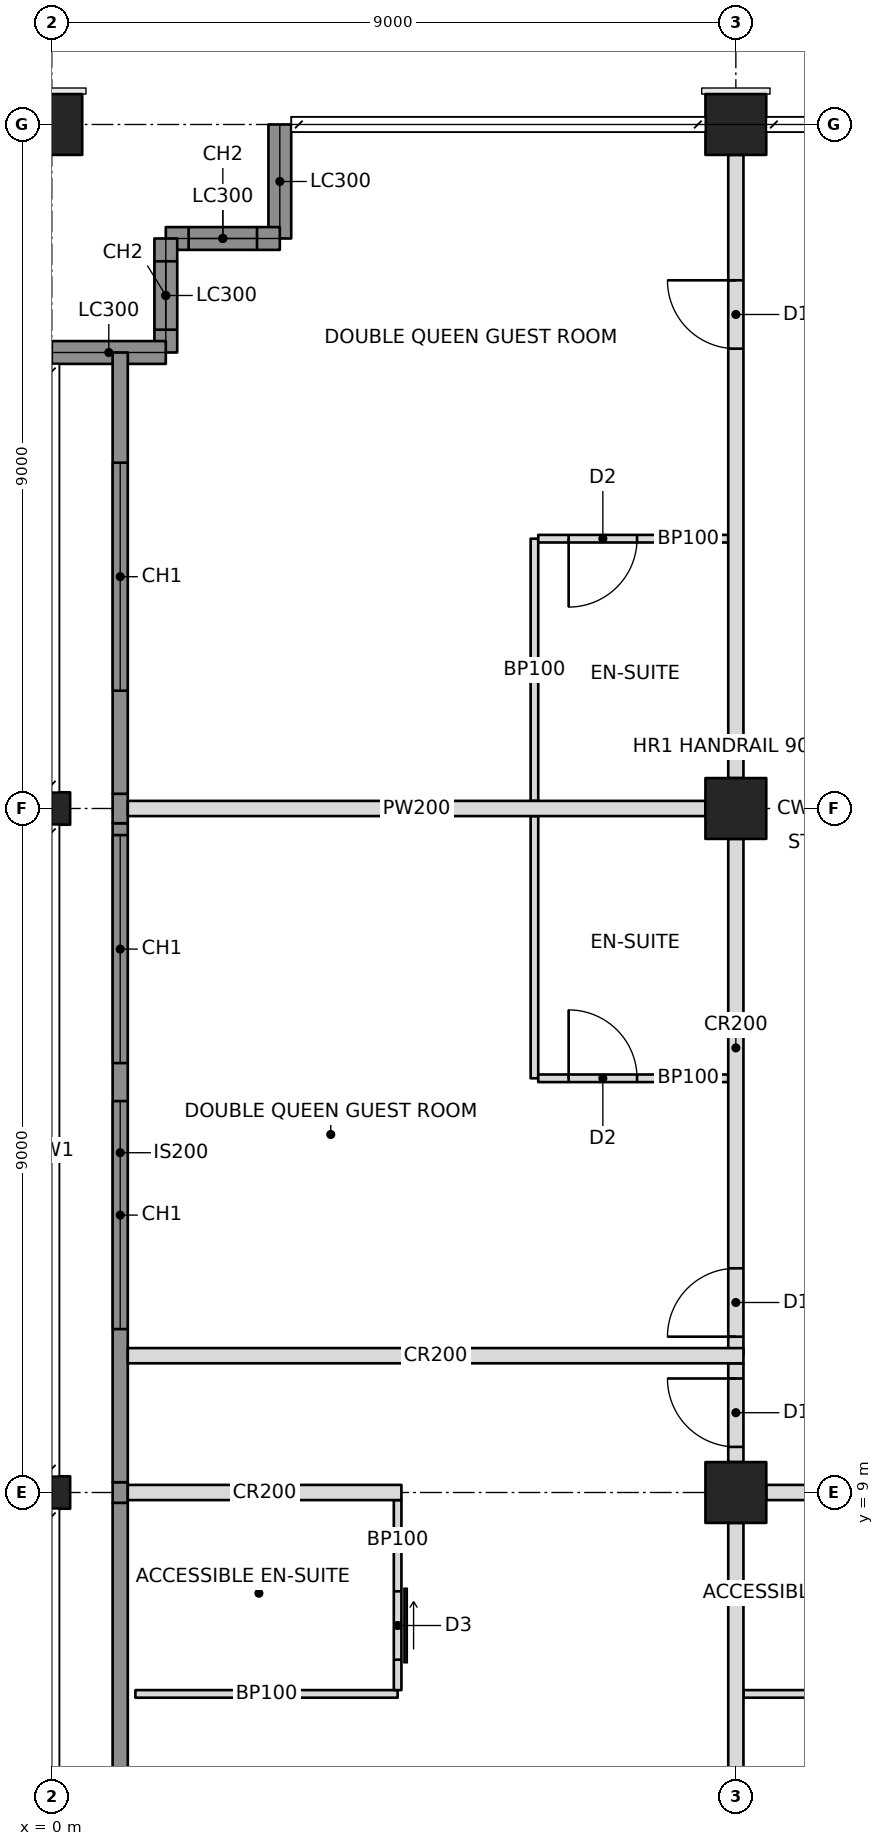
"""IFC4 building model, lengths in metres.
Left out: names, types, materials, properties, quantities, classifications, styles, units other than length and angle.
Written with IfcOpenShell. Run it as: python <this file> out.ifc"""

import sys

from ifc_helpers import new_model, si_unit, direction, frame, frame_2d, origin, origin_2d, place, context, subcontext, project, spatial, rectangle, hollow_rectangle, i_section, extrude, element, fill, save


model = new_model("IFC4")
c1 = context("Model", 3, precision=1e-05, world=origin(), true_north=direction((0.0, 1.0)))
c2 = subcontext(c1, "Body", "Model", "MODEL_VIEW")
j1 = project(units=[si_unit("LENGTHUNIT", "METRE"), si_unit("PLANEANGLEUNIT", "RADIAN")], contexts=[c1])
p1 = place(None, origin())
s1 = spatial("IfcSite", under=j1, at=p1, CompositionType="ELEMENT")
p2 = place(p1, origin())
s2 = spatial("IfcBuilding", under=s1, at=p2, CompositionType="ELEMENT")
p3 = place(p2, frame((0.0, 0.0, 197.8)))
s3 = spatial("IfcBuildingStorey", under=s2, at=p3, CompositionType="ELEMENT", Elevation=197.8)
for number, where, z_axis, x_axis in (
    (1, (0.0, 9.0, 0.0), (0.0, 0.0, 1.0), (0.0, 1.0, 0.0)),
    (2, (0.0, 18.0, 0.0), (0.0, 0.0, 1.0), (0.0, 1.0, 0.0)),
):
    element("IfcColumn", number, at=place(p3, frame(where, z_axis=z_axis, x_axis=x_axis)), inside=s3, PredefinedType="COLUMN", context=c2, shape_type="SweptSolid", body=[
        extrude(i_section(OverallWidth=0.427, OverallDepth=0.483, WebThickness=0.051, FlangeThickness=0.082, at=origin_2d()), origin(), (0.0, 0.0, 1.0), 3.4),
    ])
p4 = place(p3, frame((0.0, 27.0, 0.0), z_axis=(0.0, 0.0, 1.0), x_axis=(0.0, 1.0, 0.0)))
e3 = element("IfcColumn", 3, at=p4, inside=s3, PredefinedType="COLUMN", context=c2, shape_type="SweptSolid", body=[
    extrude(hollow_rectangle(XDim=0.8, YDim=0.8, WallThickness=0.06, at=origin_2d()), origin(), (0.0, 0.0, 1.0), 3.4),
])
for number, where, z_axis, x_axis in (
    (4, (9.0, 9.0, 0.0), (0.0, 0.0, 1.0), (1.0, 0.0, 0.0)),
    (5, (9.0, 18.0, 0.0), (0.0, 0.0, 1.0), (1.0, 0.0, 0.0)),
):
    element("IfcColumn", number, at=place(p3, frame(where, z_axis=z_axis, x_axis=x_axis)), inside=s3, PredefinedType="COLUMN", context=c2, shape_type="SweptSolid", body=[
        extrude(hollow_rectangle(XDim=0.8, YDim=0.8, WallThickness=0.05, at=origin_2d()), origin(), (0.0, 0.0, 1.0), 3.4),
    ])
p5 = place(p3, frame((9.0, 27.0, 0.0), z_axis=(0.0, 0.0, 1.0), x_axis=(1.0, 0.0, 0.0)))
e6 = element("IfcColumn", 6, at=p5, inside=s3, PredefinedType="COLUMN", context=c2, shape_type="SweptSolid", body=[
    extrude(hollow_rectangle(XDim=0.8, YDim=0.8, WallThickness=0.06, at=origin_2d()), origin(), (0.0, 0.0, 1.0), 3.4),
])
p6 = place(p3, frame((3.0, 27.0, 0.0), z_axis=(0.0, 0.0, 1.0), x_axis=(0.0, -1.0, 0.0)))
e7 = element("IfcWall", 7, at=p6, inside=s3, PredefinedType="SOLIDWALL", context=c2, shape_type="SweptSolid", body=[
    extrude(rectangle(XDim=1.5, YDim=0.3, at=frame_2d((0.75, 0.0))), origin(), (0.0, 0.0, 1.0), 2.42),
])
p7 = place(p3, frame((3.0, 25.5, 0.0), z_axis=(0.0, 0.0, 1.0), x_axis=(-1.0, 0.0, 0.0)))
e8 = element("IfcWall", 8, at=p7, inside=s3, PredefinedType="SOLIDWALL", context=c2, shape_type="SweptSolid", body=[
    extrude(rectangle(XDim=1.5, YDim=0.3, at=frame_2d((0.75, 0.0))), origin(), (0.0, 0.0, 1.0), 3.2),
])
p8 = place(p7, frame((0.3, 0.0, 0.6)))
e9 = element("IfcOpeningElement", 9, at=p8, cuts=e8, PredefinedType="OPENING", context=c2, shape_type="SweptSolid", body=[
    extrude(rectangle(XDim=0.9, YDim=2.2, at=frame_2d((0.45, 1.1))), frame((0.0, 0.16, 0.0), z_axis=(0.0, -1.0, 0.0), x_axis=(1.0, 0.0, 0.0)), (0.0, 0.0, 1.0), 0.32),
])
p9 = place(p3, frame((1.5, 25.5, 0.0), z_axis=(0.0, 0.0, 1.0), x_axis=(0.0, -1.0, 0.0)))
e10 = element("IfcWall", 10, at=p9, inside=s3, PredefinedType="SOLIDWALL", context=c2, shape_type="SweptSolid", body=[
    extrude(rectangle(XDim=1.5, YDim=0.3, at=frame_2d((0.75, 0.0))), origin(), (0.0, 0.0, 1.0), 3.2),
])
p10 = place(p9, frame((0.3, 0.0, 0.6)))
e11 = element("IfcOpeningElement", 11, at=p10, cuts=e10, PredefinedType="OPENING", context=c2, shape_type="SweptSolid", body=[
    extrude(rectangle(XDim=0.9, YDim=2.2, at=frame_2d((0.45, 1.1))), frame((0.0, 0.16, 0.0), z_axis=(0.0, -1.0, 0.0), x_axis=(1.0, 0.0, 0.0)), (0.0, 0.0, 1.0), 0.32),
])
p11 = place(p3, frame((1.5, 24.0, 0.0), z_axis=(0.0, 0.0, 1.0), x_axis=(-1.0, 0.0, 0.0)))
e12 = element("IfcWall", 12, at=p11, inside=s3, PredefinedType="SOLIDWALL", context=c2, shape_type="SweptSolid", body=[
    extrude(rectangle(XDim=1.5, YDim=0.3, at=frame_2d((0.75, 0.0))), origin(), (0.0, 0.0, 1.0), 2.42),
])
p12 = place(p3, frame((1.0, 9.0, 0.0), z_axis=(0.0, 0.0, 1.0), x_axis=(1.0, 0.0, 0.0)))
e13 = element("IfcWall", 13, at=p12, inside=s3, PredefinedType="PARTITIONING", context=c2, shape_type="SweptSolid", body=[
    extrude(rectangle(XDim=3.6, YDim=0.2, at=frame_2d((1.8, 0.0))), origin(), (0.0, 0.0, 1.0), 2.438),
])
p13 = place(p3, frame((9.4, 9.0, 0.0), z_axis=(0.0, 0.0, 1.0), x_axis=(1.0, 0.0, 0.0)))
e14 = element("IfcWall", 14, at=p13, inside=s3, PredefinedType="PARTITIONING", context=c2, shape_type="SweptSolid", body=[
    extrude(rectangle(XDim=8.2, YDim=0.2, at=frame_2d((4.1, 0.0))), origin(), (0.0, 0.0, 1.0), 2.405),
])
p14 = place(p13, frame((2.95, 0.0, 0.0)))
e15 = element("IfcOpeningElement", 15, at=p14, cuts=e14, PredefinedType="OPENING", context=c2, shape_type="SweptSolid", body=[
    extrude(rectangle(XDim=0.9, YDim=2.1, at=frame_2d((0.45, 1.05))), frame((0.0, 0.11, 0.0), z_axis=(0.0, -1.0, 0.0), x_axis=(1.0, 0.0, 0.0)), (0.0, 0.0, 1.0), 0.22),
])
p15 = place(p13, frame((4.35, 0.0, 0.0)))
e16 = element("IfcOpeningElement", 16, at=p15, cuts=e14, PredefinedType="OPENING", context=c2, shape_type="SweptSolid", body=[
    extrude(rectangle(XDim=0.9, YDim=2.1, at=frame_2d((0.45, 1.05))), frame((0.0, 0.11, 0.0), z_axis=(0.0, -1.0, 0.0), x_axis=(1.0, 0.0, 0.0)), (0.0, 0.0, 1.0), 0.22),
])
p16 = place(p3, frame((9.0, 10.8, 0.0), z_axis=(0.0, 0.0, 1.0), x_axis=(0.0, 1.0, 0.0)))
e17 = element("IfcWall", 17, at=p16, inside=s3, PredefinedType="PARTITIONING", context=c2, shape_type="SweptSolid", body=[
    extrude(rectangle(XDim=6.8, YDim=0.2, at=frame_2d((3.4, 0.0))), origin(), (0.0, 0.0, 1.0), 2.405),
])
p17 = place(p16, frame((0.25, 0.0, 0.0)))
e18 = element("IfcOpeningElement", 18, at=p17, cuts=e17, PredefinedType="OPENING", context=c2, shape_type="SweptSolid", body=[
    extrude(rectangle(XDim=0.9, YDim=2.1, at=frame_2d((0.45, 1.05))), frame((0.0, 0.11, 0.0), z_axis=(0.0, -1.0, 0.0), x_axis=(1.0, 0.0, 0.0)), (0.0, 0.0, 1.0), 0.22),
])
p18 = place(p3, frame((9.0, 18.4, 0.0), z_axis=(0.0, 0.0, 1.0), x_axis=(0.0, 1.0, 0.0)))
e19 = element("IfcWall", 19, at=p18, inside=s3, PredefinedType="PARTITIONING", context=c2, shape_type="SweptSolid", body=[
    extrude(rectangle(XDim=8.2, YDim=0.2, at=frame_2d((4.1, 0.0))), origin(), (0.0, 0.0, 1.0), 2.405),
])
p19 = place(p18, frame((5.65, 0.0, 0.0)))
e20 = element("IfcOpeningElement", 20, at=p19, cuts=e19, PredefinedType="OPENING", context=c2, shape_type="SweptSolid", body=[
    extrude(rectangle(XDim=0.9, YDim=2.1, at=frame_2d((0.45, 1.05))), frame((0.0, 0.11, 0.0), z_axis=(0.0, -1.0, 0.0), x_axis=(1.0, 0.0, 0.0)), (0.0, 0.0, 1.0), 0.22),
])
p20 = place(p3, frame((1.0, 10.8, 0.0), z_axis=(0.0, 0.0, 1.0), x_axis=(1.0, 0.0, 0.0)))
e21 = element("IfcWall", 21, at=p20, inside=s3, PredefinedType="PARTITIONING", context=c2, shape_type="SweptSolid", body=[
    extrude(rectangle(XDim=8.1, YDim=0.2, at=frame_2d((4.05, 0.0))), origin(), (0.0, 0.0, 1.0), 2.404),
])
p21 = place(p3, frame((9.0, 8.6, 0.0), z_axis=(0.0, 0.0, 1.0), x_axis=(0.0, -1.0, 0.0)))
e22 = element("IfcWall", 22, at=p21, inside=s3, PredefinedType="PARTITIONING", context=c2, shape_type="SweptSolid", body=[
    extrude(rectangle(XDim=7.6, YDim=0.2, at=frame_2d((3.8, 0.0))), origin(), (0.0, 0.0, 1.0), 2.438),
])
p22 = place(p3, frame((1.1, 6.35, 0.0), z_axis=(0.0, 0.0, 1.0), x_axis=(1.0, 0.0, 0.0)))
e23 = element("IfcWall", 23, at=p22, inside=s3, PredefinedType="PARTITIONING", context=c2, shape_type="SweptSolid", body=[
    extrude(rectangle(XDim=3.45, YDim=0.1, at=frame_2d((1.725, 0.0))), origin(), (0.0, 0.0, 1.0), 3.2),
])
p23 = place(p3, frame((4.55, 8.9, 0.0), z_axis=(0.0, 0.0, 1.0), x_axis=(0.0, -1.0, 0.0)))
e24 = element("IfcWall", 24, at=p23, inside=s3, PredefinedType="PARTITIONING", context=c2, shape_type="SweptSolid", body=[
    extrude(rectangle(XDim=2.5, YDim=0.1, at=frame_2d((1.25, 0.0))), origin(), (0.0, 0.0, 1.0), 2.438),
])
p24 = place(p23, frame((1.2, 0.0, 0.0)))
e25 = element("IfcOpeningElement", 25, at=p24, cuts=e24, PredefinedType="OPENING", context=c2, shape_type="SweptSolid", body=[
    extrude(rectangle(XDim=0.9, YDim=2.1, at=frame_2d((0.45, 1.05))), frame((0.0, 0.06, 0.0), z_axis=(0.0, -1.0, 0.0), x_axis=(1.0, 0.0, 0.0)), (0.0, 0.0, 1.0), 0.12),
])
p25 = place(p3, frame((9.1, 6.35, 0.0), z_axis=(0.0, 0.0, 1.0), x_axis=(1.0, 0.0, 0.0)))
e26 = element("IfcWall", 26, at=p25, inside=s3, PredefinedType="PARTITIONING", context=c2, shape_type="SweptSolid", body=[
    extrude(rectangle(XDim=2.95, YDim=0.1, at=frame_2d((1.475, 0.0))), origin(), (0.0, 0.0, 1.0), 2.438),
])
p26 = place(p3, frame((8.6, 18.0, 0.0), z_axis=(0.0, 0.0, 1.0), x_axis=(-1.0, 0.0, 0.0)))
e27 = element("IfcWall", 27, at=p26, inside=s3, PredefinedType="PARTITIONING", context=c2, shape_type="SweptSolid", body=[
    extrude(rectangle(XDim=7.6, YDim=0.2, at=frame_2d((3.8, 0.0))), origin(), (0.0, 0.0, 1.0), 2.405),
])
p27 = place(p3, frame((6.35, 14.45, 0.0), z_axis=(0.0, 0.0, 1.0), x_axis=(0.0, 1.0, 0.0)))
e28 = element("IfcWall", 28, at=p27, inside=s3, PredefinedType="PARTITIONING", context=c2, shape_type="SweptSolid", body=[
    extrude(rectangle(XDim=3.45, YDim=0.1, at=frame_2d((1.725, 0.0))), origin(), (0.0, 0.0, 1.0), 2.404),
])
p28 = place(p3, frame((8.9, 14.45, 0.0), z_axis=(0.0, 0.0, 1.0), x_axis=(-1.0, 0.0, 0.0)))
e29 = element("IfcWall", 29, at=p28, inside=s3, PredefinedType="PARTITIONING", context=c2, shape_type="SweptSolid", body=[
    extrude(rectangle(XDim=2.5, YDim=0.1, at=frame_2d((1.25, 0.0))), origin(), (0.0, 0.0, 1.0), 2.404),
])
p29 = place(p28, frame((1.2, 0.0, 0.0)))
e30 = element("IfcOpeningElement", 30, at=p29, cuts=e29, PredefinedType="OPENING", context=c2, shape_type="SweptSolid", body=[
    extrude(rectangle(XDim=0.9, YDim=2.1, at=frame_2d((0.45, 1.05))), frame((0.0, 0.06, 0.0), z_axis=(0.0, -1.0, 0.0), x_axis=(1.0, 0.0, 0.0)), (0.0, 0.0, 1.0), 0.12),
])
p30 = place(p3, frame((6.35, 18.1, 0.0), z_axis=(0.0, 0.0, 1.0), x_axis=(0.0, 1.0, 0.0)))
e31 = element("IfcWall", 31, at=p30, inside=s3, PredefinedType="PARTITIONING", context=c2, shape_type="SweptSolid", body=[
    extrude(rectangle(XDim=3.45, YDim=0.1, at=frame_2d((1.725, 0.0))), origin(), (0.0, 0.0, 1.0), 2.404),
])
p31 = place(p3, frame((8.9, 21.55, 0.0), z_axis=(0.0, 0.0, 1.0), x_axis=(-1.0, 0.0, 0.0)))
e32 = element("IfcWall", 32, at=p31, inside=s3, PredefinedType="PARTITIONING", context=c2, shape_type="SweptSolid", body=[
    extrude(rectangle(XDim=2.5, YDim=0.1, at=frame_2d((1.25, 0.0))), origin(), (0.0, 0.0, 1.0), 2.404),
])
p32 = place(p31, frame((1.2, 0.0, 0.0)))
e33 = element("IfcOpeningElement", 33, at=p32, cuts=e32, PredefinedType="OPENING", context=c2, shape_type="SweptSolid", body=[
    extrude(rectangle(XDim=0.9, YDim=2.1, at=frame_2d((0.45, 1.05))), frame((0.0, 0.06, 0.0), z_axis=(0.0, -1.0, 0.0), x_axis=(1.0, 0.0, 0.0)), (0.0, 0.0, 1.0), 0.12),
])
p33 = place(p3, frame((9.0, 9.4, 0.0), z_axis=(0.0, 0.0, 1.0), x_axis=(0.0, 1.0, 0.0)))
e34 = element("IfcWall", 34, at=p33, inside=s3, PredefinedType="PARTITIONING", context=c2, shape_type="SweptSolid", body=[
    extrude(rectangle(XDim=1.3, YDim=0.2, at=frame_2d((0.65, 0.0))), origin(), (0.0, 0.0, 1.0), 2.405),
])
p34 = place(p33, frame((0.2, 0.0, 0.0)))
e35 = element("IfcOpeningElement", 35, at=p34, cuts=e34, PredefinedType="OPENING", context=c2, shape_type="SweptSolid", body=[
    extrude(rectangle(XDim=0.9, YDim=2.1, at=frame_2d((0.45, 1.05))), frame((0.0, 0.11, 0.0), z_axis=(0.0, -1.0, 0.0), x_axis=(1.0, 0.0, 0.0)), (0.0, 0.0, 1.0), 0.22),
])
p35 = place(p3, frame((0.9, 4.607, 0.0), z_axis=(0.0, 0.0, 1.0), x_axis=(0.0, 1.0, 0.0)))
e36 = element("IfcWall", 36, at=p35, inside=s3, PredefinedType="SOLIDWALL", context=c2, shape_type="SweptSolid", body=[
    extrude(rectangle(XDim=4.257, YDim=0.2, at=frame_2d((2.129, 0.0))), origin(), (0.0, 0.0, 1.0), 3.2),
])
p36 = place(p3, frame((0.9, 8.865, 0.0), z_axis=(0.0, 0.0, 1.0), x_axis=(0.0, 1.0, 0.0)))
e37 = element("IfcWall", 37, at=p36, inside=s3, PredefinedType="SOLIDWALL", context=c2, shape_type="SweptSolid", body=[
    extrude(rectangle(XDim=0.271, YDim=0.2, at=frame_2d((0.135, 0.0))), origin(), (0.0, 0.0, 1.0), 2.438),
])
p37 = place(p3, frame((0.9, 9.135, 0.0), z_axis=(0.0, 0.0, 1.0), x_axis=(0.0, 1.0, 0.0)))
e38 = element("IfcWall", 38, at=p37, inside=s3, PredefinedType="SOLIDWALL", context=c2, shape_type="SweptSolid", body=[
    extrude(rectangle(XDim=8.671, YDim=0.2, at=frame_2d((4.335, 0.0))), origin(), (0.0, 0.0, 1.0), 3.2),
])
p38 = place(p37, frame((2.015, 0.0, 0.6)))
e39 = element("IfcOpeningElement", 39, at=p38, cuts=e38, PredefinedType="OPENING", context=c2, shape_type="SweptSolid", body=[
    extrude(rectangle(XDim=3.0, YDim=2.2, at=frame_2d((1.5, 1.1))), frame((0.0, 0.11, 0.0), z_axis=(0.0, -1.0, 0.0), x_axis=(1.0, 0.0, 0.0)), (0.0, 0.0, 1.0), 0.22),
])
p39 = place(p37, frame((5.515, 0.0, 0.6)))
e40 = element("IfcOpeningElement", 40, at=p39, cuts=e38, PredefinedType="OPENING", context=c2, shape_type="SweptSolid", body=[
    extrude(rectangle(XDim=3.0, YDim=2.2, at=frame_2d((1.5, 1.1))), frame((0.0, 0.11, 0.0), z_axis=(0.0, -1.0, 0.0), x_axis=(1.0, 0.0, 0.0)), (0.0, 0.0, 1.0), 0.22),
])
p40 = place(p3, frame((0.9, 17.806, 0.0), z_axis=(0.0, 0.0, 1.0), x_axis=(0.0, 1.0, 0.0)))
e41 = element("IfcWall", 41, at=p40, inside=s3, PredefinedType="SOLIDWALL", context=c2, shape_type="SweptSolid", body=[
    extrude(rectangle(XDim=0.388, YDim=0.2, at=frame_2d((0.194, 0.0))), origin(), (0.0, 0.0, 1.0), 2.404),
])
p41 = place(p3, frame((0.9, 18.194, 0.0), z_axis=(0.0, 0.0, 1.0), x_axis=(0.0, 1.0, 0.0)))
e42 = element("IfcWall", 42, at=p41, inside=s3, PredefinedType="SOLIDWALL", context=c2, shape_type="SweptSolid", body=[
    extrude(rectangle(XDim=5.806, YDim=0.2, at=frame_2d((2.903, 0.0))), origin(), (0.0, 0.0, 1.0), 3.2),
])
p42 = place(p41, frame((1.356, 0.0, 0.6)))
e43 = element("IfcOpeningElement", 43, at=p42, cuts=e42, PredefinedType="OPENING", context=c2, shape_type="SweptSolid", body=[
    extrude(rectangle(XDim=3.0, YDim=2.2, at=frame_2d((1.5, 1.1))), frame((0.0, 0.11, 0.0), z_axis=(0.0, -1.0, 0.0), x_axis=(1.0, 0.0, 0.0)), (0.0, 0.0, 1.0), 0.22),
])
p43 = place(p8, origin())
e44 = element("IfcWindow", 44, at=p43, inside=s3, PartitioningType="SINGLE_PANEL", PredefinedType="WINDOW", context=c2, shape_type="SweptSolid", body=[
    extrude(rectangle(XDim=0.9, YDim=2.2, at=frame_2d((0.45, 1.1))), frame((0.0, 0.03, 0.0), z_axis=(0.0, -1.0, 0.0), x_axis=(1.0, 0.0, 0.0)), (0.0, 0.0, 1.0), 0.06),
])
fill(e9, e44)
p44 = place(p10, origin())
e45 = element("IfcWindow", 45, at=p44, inside=s3, PartitioningType="SINGLE_PANEL", PredefinedType="WINDOW", context=c2, shape_type="SweptSolid", body=[
    extrude(rectangle(XDim=0.9, YDim=2.2, at=frame_2d((0.45, 1.1))), frame((0.0, 0.03, 0.0), z_axis=(0.0, -1.0, 0.0), x_axis=(1.0, 0.0, 0.0)), (0.0, 0.0, 1.0), 0.06),
])
fill(e11, e45)
p45 = place(p38, origin())
e46 = element("IfcWindow", 46, at=p45, inside=s3, PartitioningType="TRIPLE_PANEL_VERTICAL", PredefinedType="WINDOW", context=c2, shape_type="SweptSolid", body=[
    extrude(rectangle(XDim=3.0, YDim=2.2, at=frame_2d((1.5, 1.1))), frame((0.0, 0.03, 0.0), z_axis=(0.0, -1.0, 0.0), x_axis=(1.0, 0.0, 0.0)), (0.0, 0.0, 1.0), 0.06),
])
fill(e39, e46)
p46 = place(p39, origin())
e47 = element("IfcWindow", 47, at=p46, inside=s3, PartitioningType="TRIPLE_PANEL_VERTICAL", PredefinedType="WINDOW", context=c2, shape_type="SweptSolid", body=[
    extrude(rectangle(XDim=3.0, YDim=2.2, at=frame_2d((1.5, 1.1))), frame((0.0, 0.03, 0.0), z_axis=(0.0, -1.0, 0.0), x_axis=(1.0, 0.0, 0.0)), (0.0, 0.0, 1.0), 0.06),
])
fill(e40, e47)
p47 = place(p42, origin())
e48 = element("IfcWindow", 48, at=p47, inside=s3, PartitioningType="TRIPLE_PANEL_VERTICAL", PredefinedType="WINDOW", context=c2, shape_type="SweptSolid", body=[
    extrude(rectangle(XDim=3.0, YDim=2.2, at=frame_2d((1.5, 1.1))), frame((0.0, 0.03, 0.0), z_axis=(0.0, -1.0, 0.0), x_axis=(1.0, 0.0, 0.0)), (0.0, 0.0, 1.0), 0.06),
])
fill(e43, e48)
p48 = place(p24, origin())
e49 = element("IfcDoor", 49, at=p48, inside=s3, OperationType="SLIDING_TO_LEFT", PredefinedType="DOOR", context=c2, shape_type="SweptSolid", body=[
    extrude(rectangle(XDim=0.9, YDim=2.1, at=frame_2d((0.45, 1.05))), frame((0.0, 0.025, 0.0), z_axis=(0.0, -1.0, 0.0), x_axis=(1.0, 0.0, 0.0)), (0.0, 0.0, 1.0), 0.05),
])
fill(e25, e49)
p49 = place(p29, frame((0.9, 0.0, 0.0), z_axis=(0.0, 0.0, 1.0), x_axis=(-1.0, 0.0, 0.0)))
e50 = element("IfcDoor", 50, at=p49, inside=s3, OperationType="SINGLE_SWING_LEFT", PredefinedType="DOOR", context=c2, shape_type="SweptSolid", body=[
    extrude(rectangle(XDim=0.9, YDim=2.1, at=frame_2d((0.45, 1.05))), frame((0.0, 0.025, 0.0), z_axis=(0.0, -1.0, 0.0), x_axis=(1.0, 0.0, 0.0)), (0.0, 0.0, 1.0), 0.05),
])
fill(e30, e50)
p50 = place(p17, origin())
e51 = element("IfcDoor", 51, at=p50, inside=s3, OperationType="SINGLE_SWING_LEFT", PredefinedType="DOOR", context=c2, shape_type="SweptSolid", body=[
    extrude(rectangle(XDim=0.9, YDim=2.1, at=frame_2d((0.45, 1.05))), frame((0.0, 0.025, 0.0), z_axis=(0.0, -1.0, 0.0), x_axis=(1.0, 0.0, 0.0)), (0.0, 0.0, 1.0), 0.05),
])
fill(e18, e51)
p51 = place(p32, origin())
e52 = element("IfcDoor", 52, at=p51, inside=s3, OperationType="SINGLE_SWING_RIGHT", PredefinedType="DOOR", context=c2, shape_type="SweptSolid", body=[
    extrude(rectangle(XDim=0.9, YDim=2.1, at=frame_2d((0.45, 1.05))), frame((0.0, 0.025, 0.0), z_axis=(0.0, -1.0, 0.0), x_axis=(1.0, 0.0, 0.0)), (0.0, 0.0, 1.0), 0.05),
])
fill(e33, e52)
p52 = place(p19, origin())
e53 = element("IfcDoor", 53, at=p52, inside=s3, OperationType="SINGLE_SWING_RIGHT", PredefinedType="DOOR", context=c2, shape_type="SweptSolid", body=[
    extrude(rectangle(XDim=0.9, YDim=2.1, at=frame_2d((0.45, 1.05))), frame((0.0, 0.025, 0.0), z_axis=(0.0, -1.0, 0.0), x_axis=(1.0, 0.0, 0.0)), (0.0, 0.0, 1.0), 0.05),
])
fill(e20, e53)
p53 = place(p34, origin())
e54 = element("IfcDoor", 54, at=p53, inside=s3, OperationType="SINGLE_SWING_RIGHT", PredefinedType="DOOR", context=c2, shape_type="SweptSolid", body=[
    extrude(rectangle(XDim=0.9, YDim=2.1, at=frame_2d((0.45, 1.05))), frame((0.0, 0.025, 0.0), z_axis=(0.0, -1.0, 0.0), x_axis=(1.0, 0.0, 0.0)), (0.0, 0.0, 1.0), 0.05),
])
fill(e35, e54)
save(model, sys.argv[1])
